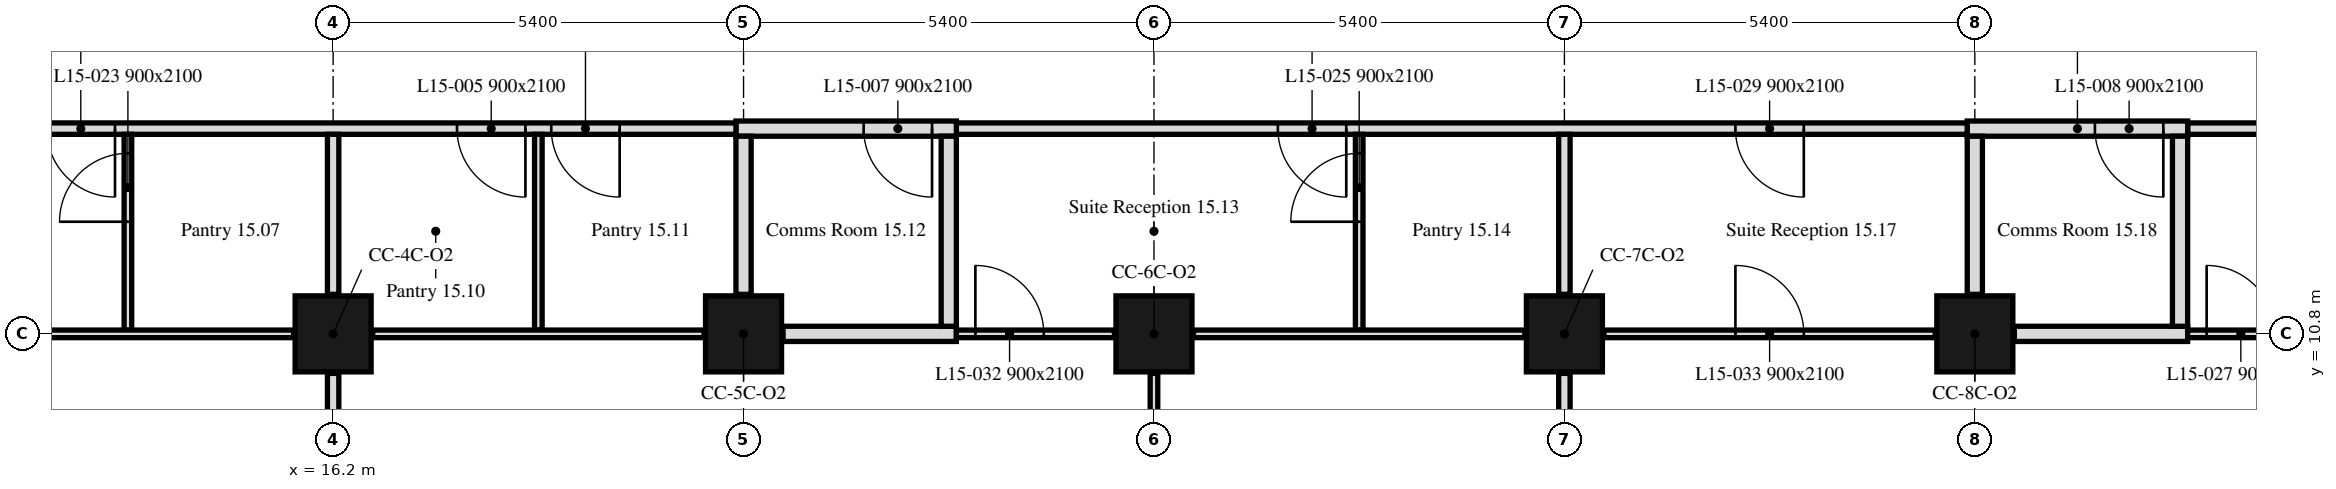
"""IFC4 building model, lengths in metres.
Left out: names, types, materials, properties, quantities, classifications, styles, units other than length and angle.
Written with IfcOpenShell. Run it as: python <this file> out.ifc"""

import sys

from ifc_helpers import new_model, si_unit, direction, frame, frame_2d, origin, origin_2d, place, context, subcontext, project, spatial, rectangle, extrude, element, fill, save


model = new_model("IFC4")
c1 = context("Model", 3, precision=1e-05, world=origin(), true_north=direction((0.0, 1.0)))
c2 = subcontext(c1, "Body", "Model", "MODEL_VIEW")
j1 = project(units=[si_unit("LENGTHUNIT", "METRE"), si_unit("PLANEANGLEUNIT", "RADIAN")], contexts=[c1])
p1 = place(None, origin())
s1 = spatial("IfcSite", under=j1, at=p1, CompositionType="ELEMENT")
p2 = place(p1, origin())
s2 = spatial("IfcBuilding", under=s1, at=p2, CompositionType="ELEMENT")
p3 = place(p2, frame((0.0, 0.0, 68.8)))
s3 = spatial("IfcBuildingStorey", under=s2, at=p3, CompositionType="ELEMENT", Elevation=68.8)
for number, where, z_axis, x_axis in (
    (1, (16.2, 10.8, 0.0), (0.0, 0.0, 1.0), (1.0, 0.0, 0.0)),
    (2, (21.6, 10.8, 0.0), (0.0, 0.0, 1.0), (1.0, 0.0, 0.0)),
    (3, (27.0, 10.8, 0.0), (0.0, 0.0, 1.0), (1.0, 0.0, 0.0)),
    (4, (32.4, 10.8, 0.0), (0.0, 0.0, 1.0), (1.0, 0.0, 0.0)),
    (5, (37.8, 10.8, 0.0), (0.0, 0.0, 1.0), (1.0, 0.0, 0.0)),
):
    element("IfcColumn", number, at=place(p3, frame(where, z_axis=z_axis, x_axis=x_axis)), inside=s3, PredefinedType="COLUMN", context=c2, shape_type="SweptSolid", body=[
        extrude(rectangle(XDim=1.0, YDim=1.0, at=origin_2d()), origin(), (0.0, 0.0, 1.0), 3.5),
    ])
p4 = place(p3, frame((47.849, 13.5, 0.0), z_axis=(0.0, 0.0, 1.0), x_axis=(-1.0, 0.0, 0.0)))
e6 = element("IfcWall", 6, at=p4, inside=s3, PredefinedType="PARTITIONING", context=c2, shape_type="SweptSolid", body=[
    extrude(rectangle(XDim=7.249, YDim=0.15, at=frame_2d((3.625, 0.0))), origin(), (0.0, 0.0, 1.0), 3.5),
])
p5 = place(p4, frame((0.879, 0.0, 0.0)))
e7 = element("IfcOpeningElement", 7, at=p5, cuts=e6, PredefinedType="OPENING", context=c2, shape_type="SweptSolid", body=[
    extrude(rectangle(XDim=0.9, YDim=2.1, at=frame_2d((0.45, 1.05))), frame((0.0, 0.075, 0.0), z_axis=(0.0, -1.0, 0.0), x_axis=(1.0, 0.0, 0.0)), (0.0, 0.0, 1.0), 0.15),
])
p6 = place(p3, frame((40.6, 13.5, 0.0), z_axis=(0.0, 0.0, 1.0), x_axis=(-1.0, 0.0, 0.0)))
e8 = element("IfcWall", 8, at=p6, inside=s3, PredefinedType="PARTITIONING", context=c2, shape_type="SweptSolid", body=[
    extrude(rectangle(XDim=2.9, YDim=0.2, at=frame_2d((1.45, 0.0))), origin(), (0.0, 0.0, 1.0), 3.5),
])
p7 = place(p6, frame((0.32, 0.0, 0.0)))
e9 = element("IfcOpeningElement", 9, at=p7, cuts=e8, PredefinedType="OPENING", context=c2, shape_type="SweptSolid", body=[
    extrude(rectangle(XDim=0.9, YDim=2.1, at=frame_2d((0.45, 1.05))), frame((0.0, 0.1, 0.0), z_axis=(0.0, -1.0, 0.0), x_axis=(1.0, 0.0, 0.0)), (0.0, 0.0, 1.0), 0.2),
])
p8 = place(p3, frame((37.7, 13.5, 0.0), z_axis=(0.0, 0.0, 1.0), x_axis=(-1.0, 0.0, 0.0)))
e10 = element("IfcWall", 10, at=p8, inside=s3, PredefinedType="PARTITIONING", context=c2, shape_type="SweptSolid", body=[
    extrude(rectangle(XDim=13.3, YDim=0.15, at=frame_2d((6.65, 0.0))), origin(), (0.0, 0.0, 1.0), 3.5),
])
p9 = place(p8, frame((2.15, 0.0, 0.0)))
e11 = element("IfcOpeningElement", 11, at=p9, cuts=e10, PredefinedType="OPENING", context=c2, shape_type="SweptSolid", body=[
    extrude(rectangle(XDim=0.9, YDim=2.1, at=frame_2d((0.45, 1.05))), frame((0.0, 0.075, 0.0), z_axis=(0.0, -1.0, 0.0), x_axis=(1.0, 0.0, 0.0)), (0.0, 0.0, 1.0), 0.15),
])
p10 = place(p8, frame((8.17, 0.0, 0.0)))
e12 = element("IfcOpeningElement", 12, at=p10, cuts=e10, PredefinedType="OPENING", context=c2, shape_type="SweptSolid", body=[
    extrude(rectangle(XDim=0.9, YDim=2.1, at=frame_2d((0.45, 1.05))), frame((0.0, 0.075, 0.0), z_axis=(0.0, -1.0, 0.0), x_axis=(1.0, 0.0, 0.0)), (0.0, 0.0, 1.0), 0.15),
])
p11 = place(p3, frame((24.4, 13.5, 0.0), z_axis=(0.0, 0.0, 1.0), x_axis=(-1.0, 0.0, 0.0)))
e13 = element("IfcWall", 13, at=p11, inside=s3, PredefinedType="PARTITIONING", context=c2, shape_type="SweptSolid", body=[
    extrude(rectangle(XDim=2.9, YDim=0.2, at=frame_2d((1.45, 0.0))), origin(), (0.0, 0.0, 1.0), 3.5),
])
p12 = place(p11, frame((0.32, 0.0, 0.0)))
e14 = element("IfcOpeningElement", 14, at=p12, cuts=e13, PredefinedType="OPENING", context=c2, shape_type="SweptSolid", body=[
    extrude(rectangle(XDim=0.9, YDim=2.1, at=frame_2d((0.45, 1.05))), frame((0.0, 0.1, 0.0), z_axis=(0.0, -1.0, 0.0), x_axis=(1.0, 0.0, 0.0)), (0.0, 0.0, 1.0), 0.2),
])
p13 = place(p3, frame((21.5, 13.5, 0.0), z_axis=(0.0, 0.0, 1.0), x_axis=(-1.0, 0.0, 0.0)))
e15 = element("IfcWall", 15, at=p13, inside=s3, PredefinedType="PARTITIONING", context=c2, shape_type="SweptSolid", body=[
    extrude(rectangle(XDim=15.349, YDim=0.15, at=frame_2d((7.675, 0.0))), origin(), (0.0, 0.0, 1.0), 3.5),
])
p14 = place(p13, frame((13.57, 0.0, 0.0)))
e16 = element("IfcOpeningElement", 16, at=p14, cuts=e15, PredefinedType="OPENING", context=c2, shape_type="SweptSolid", body=[
    extrude(rectangle(XDim=0.9, YDim=2.1, at=frame_2d((0.45, 1.05))), frame((0.0, 0.075, 0.0), z_axis=(0.0, -1.0, 0.0), x_axis=(1.0, 0.0, 0.0)), (0.0, 0.0, 1.0), 0.15),
])
p15 = place(p13, frame((2.77, 0.0, 0.0)))
e17 = element("IfcOpeningElement", 17, at=p15, cuts=e15, PredefinedType="OPENING", context=c2, shape_type="SweptSolid", body=[
    extrude(rectangle(XDim=0.9, YDim=2.1, at=frame_2d((0.45, 1.05))), frame((0.0, 0.075, 0.0), z_axis=(0.0, -1.0, 0.0), x_axis=(1.0, 0.0, 0.0)), (0.0, 0.0, 1.0), 0.15),
])
p16 = place(p13, frame((1.53, 0.0, 0.0)))
e18 = element("IfcOpeningElement", 18, at=p16, cuts=e15, PredefinedType="OPENING", context=c2, shape_type="SweptSolid", body=[
    extrude(rectangle(XDim=0.9, YDim=2.1, at=frame_2d((0.45, 1.05))), frame((0.0, 0.075, 0.0), z_axis=(0.0, -1.0, 0.0), x_axis=(1.0, 0.0, 0.0)), (0.0, 0.0, 1.0), 0.15),
])
p17 = place(p13, frame((8.17, 0.0, 0.0)))
e19 = element("IfcOpeningElement", 19, at=p17, cuts=e15, PredefinedType="OPENING", context=c2, shape_type="SweptSolid", body=[
    extrude(rectangle(XDim=0.9, YDim=2.1, at=frame_2d((0.45, 1.05))), frame((0.0, 0.075, 0.0), z_axis=(0.0, -1.0, 0.0), x_axis=(1.0, 0.0, 0.0)), (0.0, 0.0, 1.0), 0.15),
])
p18 = place(p3, frame((13.5, 10.85, 0.0), z_axis=(0.0, 0.0, 1.0), x_axis=(0.0, 1.0, 0.0)))
e20 = element("IfcWall", 20, at=p18, inside=s3, PredefinedType="PARTITIONING", context=c2, shape_type="SweptSolid", body=[
    extrude(rectangle(XDim=2.575, YDim=0.1, at=frame_2d((1.288, 0.0))), origin(), (0.0, 0.0, 1.0), 3.5),
])
p19 = place(p18, frame((1.425, 0.0, 0.0)))
e21 = element("IfcOpeningElement", 21, at=p19, cuts=e20, PredefinedType="OPENING", context=c2, shape_type="SweptSolid", body=[
    extrude(rectangle(XDim=0.9, YDim=2.1, at=frame_2d((0.45, 1.05))), frame((0.0, 0.05, 0.0), z_axis=(0.0, -1.0, 0.0), x_axis=(1.0, 0.0, 0.0)), (0.0, 0.0, 1.0), 0.1),
])
p20 = place(p3, frame((11.32, 10.8, 0.0), z_axis=(0.0, 0.0, 1.0), x_axis=(1.0, 0.0, 0.0)))
e22 = element("IfcWall", 22, at=p20, inside=s3, PredefinedType="PARTITIONING", context=c2, shape_type="SweptSolid", body=[
    extrude(rectangle(XDim=4.36, YDim=0.1, at=frame_2d((2.18, 0.0))), origin(), (0.0, 0.0, 1.0), 3.5),
])
p21 = place(p3, frame((16.2, 11.32, 0.0), z_axis=(0.0, 0.0, 1.0), x_axis=(0.0, 1.0, 0.0)))
e23 = element("IfcWall", 23, at=p21, inside=s3, PredefinedType="PARTITIONING", context=c2, shape_type="SweptSolid", body=[
    extrude(rectangle(XDim=2.105, YDim=0.15, at=frame_2d((1.052, 0.0))), origin(), (0.0, 0.0, 1.0), 3.5),
])
p22 = place(p3, frame((16.2, 6.151, 0.0), z_axis=(0.0, 0.0, 1.0), x_axis=(0.0, 1.0, 0.0)))
e24 = element("IfcWall", 24, at=p22, inside=s3, PredefinedType="PARTITIONING", context=c2, shape_type="SweptSolid", body=[
    extrude(rectangle(XDim=4.129, YDim=0.15, at=frame_2d((2.064, 0.0))), origin(), (0.0, 0.0, 1.0), 3.5),
])
p23 = place(p3, frame((18.9, 10.85, 0.0), z_axis=(0.0, 0.0, 1.0), x_axis=(0.0, 1.0, 0.0)))
e25 = element("IfcWall", 25, at=p23, inside=s3, PredefinedType="PARTITIONING", context=c2, shape_type="SweptSolid", body=[
    extrude(rectangle(XDim=2.575, YDim=0.1, at=frame_2d((1.288, 0.0))), origin(), (0.0, 0.0, 1.0), 3.5),
])
p24 = place(p3, frame((16.72, 10.8, 0.0), z_axis=(0.0, 0.0, 1.0), x_axis=(1.0, 0.0, 0.0)))
e26 = element("IfcWall", 26, at=p24, inside=s3, PredefinedType="PARTITIONING", context=c2, shape_type="SweptSolid", body=[
    extrude(rectangle(XDim=4.36, YDim=0.1, at=frame_2d((2.18, 0.0))), origin(), (0.0, 0.0, 1.0), 3.5),
])
p25 = place(p3, frame((21.6, 11.32, 0.0), z_axis=(0.0, 0.0, 1.0), x_axis=(0.0, 1.0, 0.0)))
e27 = element("IfcWall", 27, at=p25, inside=s3, PredefinedType="PARTITIONING", context=c2, shape_type="SweptSolid", body=[
    extrude(rectangle(XDim=2.08, YDim=0.2, at=frame_2d((1.04, 0.0))), origin(), (0.0, 0.0, 1.0), 3.5),
])
p26 = place(p3, frame((22.12, 10.8, 0.0), z_axis=(0.0, 0.0, 1.0), x_axis=(1.0, 0.0, 0.0)))
e28 = element("IfcWall", 28, at=p26, inside=s3, PredefinedType="PARTITIONING", context=c2, shape_type="SweptSolid", body=[
    extrude(rectangle(XDim=2.28, YDim=0.2, at=frame_2d((1.14, 0.0))), origin(), (0.0, 0.0, 1.0), 3.5),
])
p27 = place(p3, frame((24.3, 10.9, 0.0), z_axis=(0.0, 0.0, 1.0), x_axis=(0.0, 1.0, 0.0)))
e29 = element("IfcWall", 29, at=p27, inside=s3, PredefinedType="PARTITIONING", context=c2, shape_type="SweptSolid", body=[
    extrude(rectangle(XDim=2.5, YDim=0.2, at=frame_2d((1.25, 0.0))), origin(), (0.0, 0.0, 1.0), 3.5),
])
p28 = place(p3, frame((24.4, 10.8, 0.0), z_axis=(0.0, 0.0, 1.0), x_axis=(1.0, 0.0, 0.0)))
e30 = element("IfcWall", 30, at=p28, inside=s3, PredefinedType="PARTITIONING", context=c2, shape_type="SweptSolid", body=[
    extrude(rectangle(XDim=2.08, YDim=0.1, at=frame_2d((1.04, 0.0))), origin(), (0.0, 0.0, 1.0), 3.5),
])
p29 = place(p28, frame((0.25, 0.0, 0.0)))
e31 = element("IfcOpeningElement", 31, at=p29, cuts=e30, PredefinedType="OPENING", context=c2, shape_type="SweptSolid", body=[
    extrude(rectangle(XDim=0.9, YDim=2.1, at=frame_2d((0.45, 1.05))), frame((0.0, 0.05, 0.0), z_axis=(0.0, -1.0, 0.0), x_axis=(1.0, 0.0, 0.0)), (0.0, 0.0, 1.0), 0.1),
])
p30 = place(p3, frame((29.7, 10.85, 0.0), z_axis=(0.0, 0.0, 1.0), x_axis=(0.0, 1.0, 0.0)))
e32 = element("IfcWall", 32, at=p30, inside=s3, PredefinedType="PARTITIONING", context=c2, shape_type="SweptSolid", body=[
    extrude(rectangle(XDim=2.575, YDim=0.1, at=frame_2d((1.288, 0.0))), origin(), (0.0, 0.0, 1.0), 3.5),
])
p31 = place(p30, frame((1.425, 0.0, 0.0)))
e33 = element("IfcOpeningElement", 33, at=p31, cuts=e32, PredefinedType="OPENING", context=c2, shape_type="SweptSolid", body=[
    extrude(rectangle(XDim=0.9, YDim=2.1, at=frame_2d((0.45, 1.05))), frame((0.0, 0.05, 0.0), z_axis=(0.0, -1.0, 0.0), x_axis=(1.0, 0.0, 0.0)), (0.0, 0.0, 1.0), 0.1),
])
p32 = place(p3, frame((27.52, 10.8, 0.0), z_axis=(0.0, 0.0, 1.0), x_axis=(1.0, 0.0, 0.0)))
e34 = element("IfcWall", 34, at=p32, inside=s3, PredefinedType="PARTITIONING", context=c2, shape_type="SweptSolid", body=[
    extrude(rectangle(XDim=4.36, YDim=0.1, at=frame_2d((2.18, 0.0))), origin(), (0.0, 0.0, 1.0), 3.5),
])
p33 = place(p3, frame((32.4, 11.32, 0.0), z_axis=(0.0, 0.0, 1.0), x_axis=(0.0, 1.0, 0.0)))
e35 = element("IfcWall", 35, at=p33, inside=s3, PredefinedType="PARTITIONING", context=c2, shape_type="SweptSolid", body=[
    extrude(rectangle(XDim=2.105, YDim=0.15, at=frame_2d((1.052, 0.0))), origin(), (0.0, 0.0, 1.0), 3.5),
])
p34 = place(p3, frame((27.0, 6.151, 0.0), z_axis=(0.0, 0.0, 1.0), x_axis=(0.0, 1.0, 0.0)))
e36 = element("IfcWall", 36, at=p34, inside=s3, PredefinedType="PARTITIONING", context=c2, shape_type="SweptSolid", body=[
    extrude(rectangle(XDim=4.129, YDim=0.1, at=frame_2d((2.064, 0.0))), origin(), (0.0, 0.0, 1.0), 3.5),
])
p35 = place(p34, frame((1.499, 0.0, 0.0)))
e37 = element("IfcOpeningElement", 37, at=p35, cuts=e36, PredefinedType="OPENING", context=c2, shape_type="SweptSolid", body=[
    extrude(rectangle(XDim=0.9, YDim=2.1, at=frame_2d((0.45, 1.05))), frame((0.0, 0.05, 0.0), z_axis=(0.0, -1.0, 0.0), x_axis=(1.0, 0.0, 0.0)), (0.0, 0.0, 1.0), 0.1),
])
p36 = place(p3, frame((32.4, 6.151, 0.0), z_axis=(0.0, 0.0, 1.0), x_axis=(0.0, 1.0, 0.0)))
e38 = element("IfcWall", 38, at=p36, inside=s3, PredefinedType="PARTITIONING", context=c2, shape_type="SweptSolid", body=[
    extrude(rectangle(XDim=4.129, YDim=0.15, at=frame_2d((2.064, 0.0))), origin(), (0.0, 0.0, 1.0), 3.5),
])
p37 = place(p3, frame((32.92, 10.8, 0.0), z_axis=(0.0, 0.0, 1.0), x_axis=(1.0, 0.0, 0.0)))
e39 = element("IfcWall", 39, at=p37, inside=s3, PredefinedType="PARTITIONING", context=c2, shape_type="SweptSolid", body=[
    extrude(rectangle(XDim=4.36, YDim=0.1, at=frame_2d((2.18, 0.0))), origin(), (0.0, 0.0, 1.0), 3.5),
])
p38 = place(p37, frame((1.73, 0.0, 0.0)))
e40 = element("IfcOpeningElement", 40, at=p38, cuts=e39, PredefinedType="OPENING", context=c2, shape_type="SweptSolid", body=[
    extrude(rectangle(XDim=0.9, YDim=2.1, at=frame_2d((0.45, 1.05))), frame((0.0, 0.05, 0.0), z_axis=(0.0, -1.0, 0.0), x_axis=(1.0, 0.0, 0.0)), (0.0, 0.0, 1.0), 0.1),
])
p39 = place(p3, frame((37.8, 11.32, 0.0), z_axis=(0.0, 0.0, 1.0), x_axis=(0.0, 1.0, 0.0)))
e41 = element("IfcWall", 41, at=p39, inside=s3, PredefinedType="PARTITIONING", context=c2, shape_type="SweptSolid", body=[
    extrude(rectangle(XDim=2.08, YDim=0.2, at=frame_2d((1.04, 0.0))), origin(), (0.0, 0.0, 1.0), 3.5),
])
p40 = place(p3, frame((38.32, 10.8, 0.0), z_axis=(0.0, 0.0, 1.0), x_axis=(1.0, 0.0, 0.0)))
e42 = element("IfcWall", 42, at=p40, inside=s3, PredefinedType="PARTITIONING", context=c2, shape_type="SweptSolid", body=[
    extrude(rectangle(XDim=2.28, YDim=0.2, at=frame_2d((1.14, 0.0))), origin(), (0.0, 0.0, 1.0), 3.5),
])
p41 = place(p3, frame((40.5, 10.9, 0.0), z_axis=(0.0, 0.0, 1.0), x_axis=(0.0, 1.0, 0.0)))
e43 = element("IfcWall", 43, at=p41, inside=s3, PredefinedType="PARTITIONING", context=c2, shape_type="SweptSolid", body=[
    extrude(rectangle(XDim=2.5, YDim=0.2, at=frame_2d((1.25, 0.0))), origin(), (0.0, 0.0, 1.0), 3.5),
])
p42 = place(p3, frame((40.6, 10.8, 0.0), z_axis=(0.0, 0.0, 1.0), x_axis=(1.0, 0.0, 0.0)))
e44 = element("IfcWall", 44, at=p42, inside=s3, PredefinedType="PARTITIONING", context=c2, shape_type="SweptSolid", body=[
    extrude(rectangle(XDim=2.08, YDim=0.1, at=frame_2d((1.04, 0.0))), origin(), (0.0, 0.0, 1.0), 3.5),
])
p43 = place(p42, frame((0.25, 0.0, 0.0)))
e45 = element("IfcOpeningElement", 45, at=p43, cuts=e44, PredefinedType="OPENING", context=c2, shape_type="SweptSolid", body=[
    extrude(rectangle(XDim=0.9, YDim=2.1, at=frame_2d((0.45, 1.05))), frame((0.0, 0.05, 0.0), z_axis=(0.0, -1.0, 0.0), x_axis=(1.0, 0.0, 0.0)), (0.0, 0.0, 1.0), 0.1),
])
p44 = place(p15, origin())
e46 = element("IfcDoor", 46, at=p44, inside=s3, OperationType="SINGLE_SWING_RIGHT", PredefinedType="DOOR", context=c2, shape_type="SweptSolid", body=[
    extrude(rectangle(XDim=0.9, YDim=2.1, at=frame_2d((0.45, 1.05))), frame((0.0, 0.025, 0.0), z_axis=(0.0, -1.0, 0.0), x_axis=(1.0, 0.0, 0.0)), (0.0, 0.0, 1.0), 0.05),
])
fill(e17, e46)
p45 = place(p16, origin())
e47 = element("IfcDoor", 47, at=p45, inside=s3, OperationType="SINGLE_SWING_RIGHT", PredefinedType="DOOR", context=c2, shape_type="SweptSolid", body=[
    extrude(rectangle(XDim=0.9, YDim=2.1, at=frame_2d((0.45, 1.05))), frame((0.0, 0.025, 0.0), z_axis=(0.0, -1.0, 0.0), x_axis=(1.0, 0.0, 0.0)), (0.0, 0.0, 1.0), 0.05),
])
fill(e18, e47)
p46 = place(p12, origin())
e48 = element("IfcDoor", 48, at=p46, inside=s3, OperationType="SINGLE_SWING_RIGHT", PredefinedType="DOOR", context=c2, shape_type="SweptSolid", body=[
    extrude(rectangle(XDim=0.9, YDim=2.1, at=frame_2d((0.45, 1.05))), frame((0.0, 0.025, 0.0), z_axis=(0.0, -1.0, 0.0), x_axis=(1.0, 0.0, 0.0)), (0.0, 0.0, 1.0), 0.05),
])
fill(e14, e48)
p47 = place(p7, origin())
e49 = element("IfcDoor", 49, at=p47, inside=s3, OperationType="SINGLE_SWING_RIGHT", PredefinedType="DOOR", context=c2, shape_type="SweptSolid", body=[
    extrude(rectangle(XDim=0.9, YDim=2.1, at=frame_2d((0.45, 1.05))), frame((0.0, 0.025, 0.0), z_axis=(0.0, -1.0, 0.0), x_axis=(1.0, 0.0, 0.0)), (0.0, 0.0, 1.0), 0.05),
])
fill(e9, e49)
p48 = place(p19, origin())
e50 = element("IfcDoor", 50, at=p48, inside=s3, OperationType="SINGLE_SWING_LEFT", PredefinedType="DOOR", context=c2, shape_type="SweptSolid", body=[
    extrude(rectangle(XDim=0.9, YDim=2.1, at=frame_2d((0.45, 1.05))), frame((0.0, 0.025, 0.0), z_axis=(0.0, -1.0, 0.0), x_axis=(1.0, 0.0, 0.0)), (0.0, 0.0, 1.0), 0.05),
])
fill(e21, e50)
p49 = place(p31, origin())
e51 = element("IfcDoor", 51, at=p49, inside=s3, OperationType="SINGLE_SWING_LEFT", PredefinedType="DOOR", context=c2, shape_type="SweptSolid", body=[
    extrude(rectangle(XDim=0.9, YDim=2.1, at=frame_2d((0.45, 1.05))), frame((0.0, 0.025, 0.0), z_axis=(0.0, -1.0, 0.0), x_axis=(1.0, 0.0, 0.0)), (0.0, 0.0, 1.0), 0.05),
])
fill(e33, e51)
p50 = place(p43, origin())
e52 = element("IfcDoor", 52, at=p50, inside=s3, OperationType="SINGLE_SWING_LEFT", PredefinedType="DOOR", context=c2, shape_type="SweptSolid", body=[
    extrude(rectangle(XDim=0.9, YDim=2.1, at=frame_2d((0.45, 1.05))), frame((0.0, 0.025, 0.0), z_axis=(0.0, -1.0, 0.0), x_axis=(1.0, 0.0, 0.0)), (0.0, 0.0, 1.0), 0.05),
])
fill(e45, e52)
p51 = place(p9, origin())
e53 = element("IfcDoor", 53, at=p51, inside=s3, OperationType="SINGLE_SWING_RIGHT", PredefinedType="DOOR", context=c2, shape_type="SweptSolid", body=[
    extrude(rectangle(XDim=0.9, YDim=2.1, at=frame_2d((0.45, 1.05))), frame((0.0, 0.025, 0.0), z_axis=(0.0, -1.0, 0.0), x_axis=(1.0, 0.0, 0.0)), (0.0, 0.0, 1.0), 0.05),
])
fill(e11, e53)
p52 = place(p29, origin())
e54 = element("IfcDoor", 54, at=p52, inside=s3, OperationType="SINGLE_SWING_LEFT", PredefinedType="DOOR", context=c2, shape_type="SweptSolid", body=[
    extrude(rectangle(XDim=0.9, YDim=2.1, at=frame_2d((0.45, 1.05))), frame((0.0, 0.025, 0.0), z_axis=(0.0, -1.0, 0.0), x_axis=(1.0, 0.0, 0.0)), (0.0, 0.0, 1.0), 0.05),
])
fill(e31, e54)
p53 = place(p38, origin())
e55 = element("IfcDoor", 55, at=p53, inside=s3, OperationType="SINGLE_SWING_RIGHT", PredefinedType="DOOR", context=c2, shape_type="SweptSolid", body=[
    extrude(rectangle(XDim=0.9, YDim=2.1, at=frame_2d((0.45, 1.05))), frame((0.0, 0.025, 0.0), z_axis=(0.0, -1.0, 0.0), x_axis=(1.0, 0.0, 0.0)), (0.0, 0.0, 1.0), 0.05),
])
fill(e40, e55)
p54 = place(p17, origin())
e56 = element("IfcDoor", 56, at=p54, inside=s3, OperationType="SINGLE_SWING_RIGHT", PredefinedType="DOOR", context=c2, shape_type="SweptSolid", body=[
    extrude(rectangle(XDim=0.9, YDim=2.1, at=frame_2d((0.45, 1.05))), frame((0.0, 0.025, 0.0), z_axis=(0.0, -1.0, 0.0), x_axis=(1.0, 0.0, 0.0)), (0.0, 0.0, 1.0), 0.05),
])
fill(e19, e56)
p55 = place(p10, origin())
e57 = element("IfcDoor", 57, at=p55, inside=s3, OperationType="SINGLE_SWING_RIGHT", PredefinedType="DOOR", context=c2, shape_type="SweptSolid", body=[
    extrude(rectangle(XDim=0.9, YDim=2.1, at=frame_2d((0.45, 1.05))), frame((0.0, 0.025, 0.0), z_axis=(0.0, -1.0, 0.0), x_axis=(1.0, 0.0, 0.0)), (0.0, 0.0, 1.0), 0.05),
])
fill(e12, e57)
save(model, sys.argv[1])
